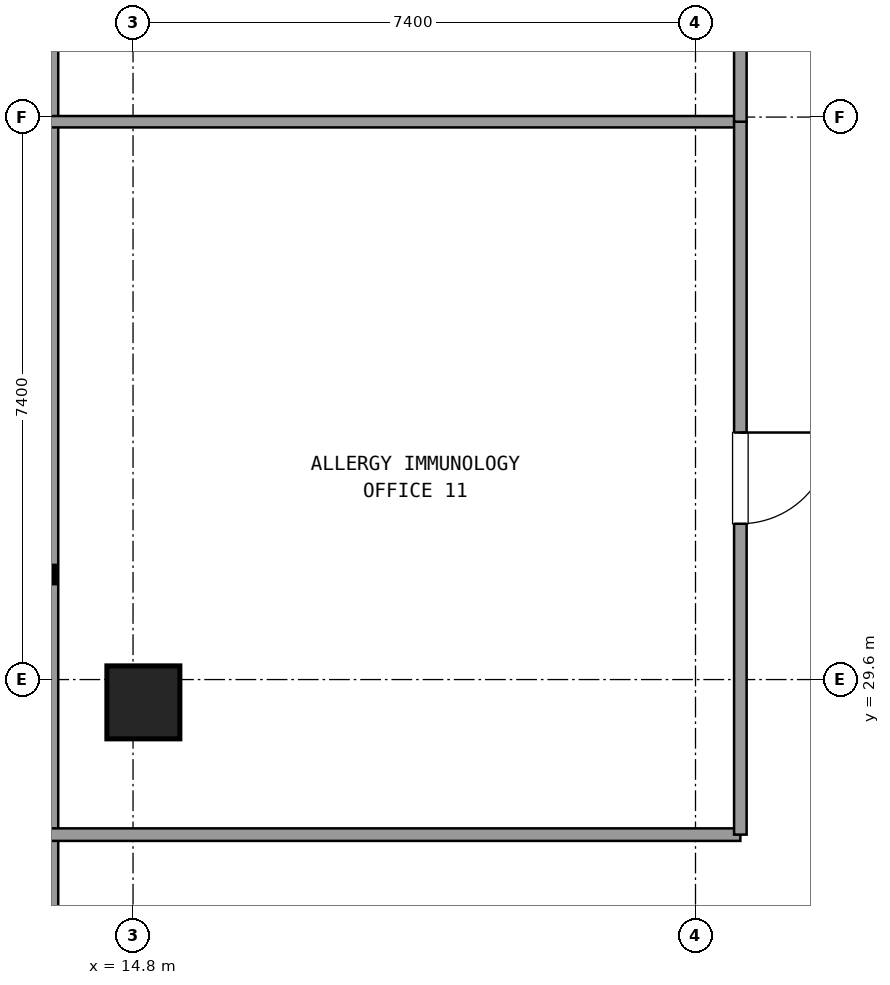
"""IFC4 building model, lengths in metres.
Left out: names, types, materials, properties, quantities, classifications, styles, units other than length and angle.
Written with IfcOpenShell. Run it as: python <this file> out.ifc"""

import sys

from ifc_helpers import new_model, si_unit, direction, frame, frame_2d, origin, origin_2d, place, context, subcontext, project, spatial, rectangle, extrude, element, fill, save


model = new_model("IFC4")
c1 = context("Model", 3, precision=1e-05, world=origin(), true_north=direction((0.0, 1.0)))
c2 = subcontext(c1, "Body", "Model", "MODEL_VIEW")
j1 = project(units=[si_unit("LENGTHUNIT", "METRE"), si_unit("PLANEANGLEUNIT", "RADIAN")], contexts=[c1])
p1 = place(None, origin())
s1 = spatial("IfcSite", under=j1, at=p1, CompositionType="ELEMENT")
p2 = place(p1, origin())
s2 = spatial("IfcBuilding", under=s1, at=p2, CompositionType="ELEMENT")
p3 = place(p2, frame((0.0, 0.0, 145.62)))
s3 = spatial("IfcBuildingStorey", under=s2, at=p3, CompositionType="ELEMENT", Elevation=145.62)
p4 = place(p3, frame((14.936, 29.3, 0.0), z_axis=(0.0, 0.0, 1.0), x_axis=(1.0, 0.0, 0.0)))
e1 = element("IfcColumn", 1, at=p4, inside=s3, PredefinedType="COLUMN", context=c2, shape_type="SweptSolid", body=[
    extrude(rectangle(XDim=0.96, YDim=0.96, at=origin_2d()), origin(), (0.0, 0.0, 1.0), 3.6),
])
p5 = place(p3, frame((13.696, 41.145, 0.0), z_axis=(0.0, 0.0, 1.0), x_axis=(0.0, -1.0, 0.0)))
e2 = element("IfcWall", 2, at=p5, inside=s3, PredefinedType="SOLIDWALL", context=c2, shape_type="SweptSolid", body=[
    extrude(rectangle(XDim=30.49, YDim=0.24, at=frame_2d((15.245, 0.0))), origin(), (0.0, 0.0, 1.0), 0.85),
])
p6 = place(p3, frame((13.716, 27.56, 0.0), z_axis=(0.0, 0.0, 1.0), x_axis=(1.0, 0.0, 0.0)))
e3 = element("IfcWall", 3, at=p6, inside=s3, PredefinedType="PARTITIONING", context=c2, shape_type="SweptSolid", body=[
    extrude(rectangle(XDim=9.074, YDim=0.165, at=frame_2d((4.537, 0.0))), origin(), (0.0, 0.0, 1.0), 2.61),
])
p7 = place(p3, frame((22.79, 36.939, 0.0), z_axis=(0.0, 0.0, 1.0), x_axis=(-1.0, 0.0, 0.0)))
e4 = element("IfcWall", 4, at=p7, inside=s3, PredefinedType="PARTITIONING", context=c2, shape_type="SweptSolid", body=[
    extrude(rectangle(XDim=9.074, YDim=0.15, at=frame_2d((4.537, 0.0))), origin(), (0.0, 0.0, 1.0), 2.61),
])
p8 = place(p3, frame((22.79, 27.56, 0.0), z_axis=(0.0, 0.0, 1.0), x_axis=(0.0, 1.0, 0.0)))
e5 = element("IfcWall", 5, at=p8, inside=s3, PredefinedType="PARTITIONING", context=c2, shape_type="SweptSolid", body=[
    extrude(rectangle(XDim=9.379, YDim=0.165, at=frame_2d((4.689, 0.0))), origin(), (0.0, 0.0, 1.0), 2.61),
])
p9 = place(p8, frame((4.09, 0.0, 0.0)))
e6 = element("IfcOpeningElement", 6, at=p9, cuts=e5, PredefinedType="OPENING", context=c2, shape_type="SweptSolid", body=[
    extrude(rectangle(XDim=1.2, YDim=2.15, at=frame_2d((0.6, 1.075))), frame((0.0, 0.093, 0.0), z_axis=(0.0, -1.0, 0.0), x_axis=(1.0, 0.0, 0.0)), (0.0, 0.0, 1.0), 0.185),
])
p10 = place(p3, frame((22.79, 36.939, 0.0), z_axis=(0.0, 0.0, 1.0), x_axis=(0.0, 1.0, 0.0)))
e7 = element("IfcWall", 7, at=p10, inside=s3, PredefinedType="PARTITIONING", context=c2, shape_type="SweptSolid", body=[
    extrude(rectangle(XDim=10.161, YDim=0.165, at=frame_2d((5.081, 0.0))), origin(), (0.0, 0.0, 1.0), 2.61),
])
p11 = place(p10, frame((4.481, 0.0, 0.0)))
e8 = element("IfcOpeningElement", 8, at=p11, cuts=e7, PredefinedType="OPENING", context=c2, shape_type="SweptSolid", body=[
    extrude(rectangle(XDim=1.2, YDim=2.15, at=frame_2d((0.6, 1.075))), frame((0.0, 0.093, 0.0), z_axis=(0.0, -1.0, 0.0), x_axis=(1.0, 0.0, 0.0)), (0.0, 0.0, 1.0), 0.185),
])
p12 = place(p9, frame((1.2, 0.0, 0.0), z_axis=(0.0, 0.0, 1.0), x_axis=(-1.0, 0.0, 0.0)))
e9 = element("IfcDoor", 9, at=p12, inside=s3, OperationType="SINGLE_SWING_RIGHT", PredefinedType="DOOR", context=c2, shape_type="SweptSolid", body=[
    extrude(rectangle(XDim=1.2, YDim=2.15, at=frame_2d((0.6, 1.075))), frame((0.0, 0.025, 0.0), z_axis=(0.0, -1.0, 0.0), x_axis=(1.0, 0.0, 0.0)), (0.0, 0.0, 1.0), 0.05),
])
fill(e6, e9)
save(model, sys.argv[1])
